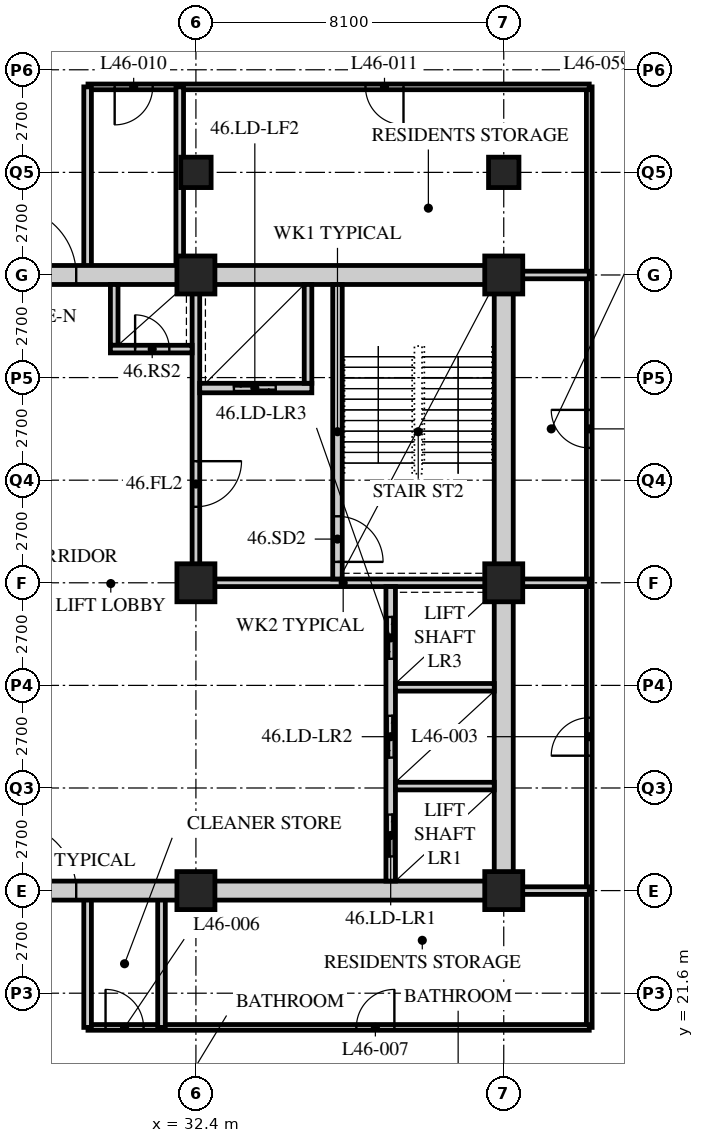
"""IFC4 building model, lengths in metres.
Left out: names, types, materials, properties, quantities, classifications, styles, units other than length and angle.
Written with IfcOpenShell. Run it as: python <this file> out.ifc"""

import sys

from ifc_helpers import new_model, si_unit, direction, frame, frame_2d, origin, origin_2d, place, context, subcontext, project, spatial, rectangle, hollow_rectangle, extrude, element, fill, save


model = new_model("IFC4")
c1 = context("Model", 3, precision=1e-05, world=origin(), true_north=direction((0.0, 1.0)))
c2 = subcontext(c1, "Body", "Model", "MODEL_VIEW")
j1 = project(units=[si_unit("LENGTHUNIT", "METRE"), si_unit("PLANEANGLEUNIT", "RADIAN")], contexts=[c1])
p1 = place(None, origin())
s1 = spatial("IfcSite", under=j1, at=p1, CompositionType="ELEMENT")
p2 = place(p1, origin())
s2 = spatial("IfcBuilding", under=s1, at=p2, CompositionType="ELEMENT")
p3 = place(p2, frame((0.0, 0.0, 181.2)))
s3 = spatial("IfcBuildingStorey", under=s2, at=p3, CompositionType="ELEMENT", Elevation=181.2)
for number, where, z_axis, x_axis in (
    (1, (32.4, 24.3, 0.0), (0.0, 0.0, 1.0), (1.0, 0.0, 0.0)),
    (2, (32.4, 32.4, 0.0), (0.0, 0.0, 1.0), (1.0, 0.0, 0.0)),
    (3, (32.4, 40.5, 0.0), (0.0, 0.0, 1.0), (1.0, 0.0, 0.0)),
):
    element("IfcColumn", number, at=place(p3, frame(where, z_axis=z_axis, x_axis=x_axis)), inside=s3, PredefinedType="COLUMN", context=c2, shape_type="SweptSolid", body=[
        extrude(hollow_rectangle(XDim=1.0, YDim=1.0, WallThickness=0.1, at=origin_2d()), origin(), (0.0, 0.0, 1.0), 3.6),
    ])
p4 = place(p3, frame((32.4, 43.2, 0.0), z_axis=(0.0, 0.0, 1.0), x_axis=(1.0, 0.0, 0.0)))
e4 = element("IfcColumn", 4, at=p4, inside=s3, PredefinedType="COLUMN", context=c2, shape_type="SweptSolid", body=[
    extrude(hollow_rectangle(XDim=0.8, YDim=0.8, WallThickness=0.08, at=origin_2d()), origin(), (0.0, 0.0, 1.0), 3.6),
])
for number, where, z_axis, x_axis in (
    (5, (40.5, 24.3, 0.0), (0.0, 0.0, 1.0), (1.0, 0.0, 0.0)),
    (6, (40.5, 32.4, 0.0), (0.0, 0.0, 1.0), (1.0, 0.0, 0.0)),
    (7, (40.5, 40.5, 0.0), (0.0, 0.0, 1.0), (1.0, 0.0, 0.0)),
):
    element("IfcColumn", number, at=place(p3, frame(where, z_axis=z_axis, x_axis=x_axis)), inside=s3, PredefinedType="COLUMN", context=c2, shape_type="SweptSolid", body=[
        extrude(hollow_rectangle(XDim=1.0, YDim=1.0, WallThickness=0.1, at=origin_2d()), origin(), (0.0, 0.0, 1.0), 3.6),
    ])
p5 = place(p3, frame((40.5, 43.2, 0.0), z_axis=(0.0, 0.0, 1.0), x_axis=(1.0, 0.0, 0.0)))
e8 = element("IfcColumn", 8, at=p5, inside=s3, PredefinedType="COLUMN", context=c2, shape_type="SweptSolid", body=[
    extrude(hollow_rectangle(XDim=0.8, YDim=0.8, WallThickness=0.08, at=origin_2d()), origin(), (0.0, 0.0, 1.0), 3.6),
])
p6 = place(p3, frame((42.75, 20.7, 0.0), z_axis=(0.0, 0.0, 1.0), x_axis=(0.0, 1.0, 0.0)))
e9 = element("IfcWall", 9, at=p6, inside=s3, PredefinedType="PARTITIONING", context=c2, shape_type="SweptSolid", body=[
    extrude(rectangle(XDim=24.75, YDim=0.15, at=frame_2d((12.375, 0.0))), origin(), (0.0, 0.0, 1.0), 3.39),
])
p7 = place(p6, frame((7.15, 0.0, 0.0)))
e10 = element("IfcOpeningElement", 10, at=p7, cuts=e9, PredefinedType="OPENING", context=c2, shape_type="SweptSolid", body=[
    extrude(rectangle(XDim=1.0, YDim=2.1, at=frame_2d((0.5, 1.05))), frame((0.0, 0.085, 0.0), z_axis=(0.0, -1.0, 0.0), x_axis=(1.0, 0.0, 0.0)), (0.0, 0.0, 1.0), 0.17),
])
p8 = place(p6, frame((15.25, 0.0, 0.0)))
e11 = element("IfcOpeningElement", 11, at=p8, cuts=e9, PredefinedType="OPENING", context=c2, shape_type="SweptSolid", body=[
    extrude(rectangle(XDim=1.0, YDim=2.1, at=frame_2d((0.5, 1.05))), frame((0.0, 0.085, 0.0), z_axis=(0.0, -1.0, 0.0), x_axis=(1.0, 0.0, 0.0)), (0.0, 0.0, 1.0), 0.17),
])
p9 = place(p3, frame((42.75, 45.45, 0.0), z_axis=(0.0, 0.0, 1.0), x_axis=(-1.0, 0.0, 0.0)))
e12 = element("IfcWall", 12, at=p9, inside=s3, PredefinedType="PARTITIONING", context=c2, shape_type="SweptSolid", body=[
    extrude(rectangle(XDim=13.19, YDim=0.15, at=frame_2d((6.595, 0.0))), origin(), (0.0, 0.0, 1.0), 3.39),
])
p10 = place(p9, frame((11.488, 0.0, 0.0)))
e13 = element("IfcOpeningElement", 13, at=p10, cuts=e12, PredefinedType="OPENING", context=c2, shape_type="SweptSolid", body=[
    extrude(rectangle(XDim=1.0, YDim=2.1, at=frame_2d((0.5, 1.05))), frame((0.0, 0.085, 0.0), z_axis=(0.0, -1.0, 0.0), x_axis=(1.0, 0.0, 0.0)), (0.0, 0.0, 1.0), 0.17),
])
p11 = place(p9, frame((4.888, 0.0, 0.0)))
e14 = element("IfcOpeningElement", 14, at=p11, cuts=e12, PredefinedType="OPENING", context=c2, shape_type="SweptSolid", body=[
    extrude(rectangle(XDim=1.0, YDim=2.1, at=frame_2d((0.5, 1.05))), frame((0.0, 0.085, 0.0), z_axis=(0.0, -1.0, 0.0), x_axis=(1.0, 0.0, 0.0)), (0.0, 0.0, 1.0), 0.17),
])
p12 = place(p3, frame((29.56, 20.7, 0.0), z_axis=(0.0, 0.0, 1.0), x_axis=(1.0, 0.0, 0.0)))
e15 = element("IfcWall", 15, at=p12, inside=s3, PredefinedType="PARTITIONING", context=c2, shape_type="SweptSolid", body=[
    extrude(rectangle(XDim=13.19, YDim=0.15, at=frame_2d((6.595, 0.0))), origin(), (0.0, 0.0, 1.0), 3.39),
])
p13 = place(p12, frame((0.462, 0.0, 0.0)))
e16 = element("IfcOpeningElement", 16, at=p13, cuts=e15, PredefinedType="OPENING", context=c2, shape_type="SweptSolid", body=[
    extrude(rectangle(XDim=1.0, YDim=2.1, at=frame_2d((0.5, 1.05))), frame((0.0, 0.085, 0.0), z_axis=(0.0, -1.0, 0.0), x_axis=(1.0, 0.0, 0.0)), (0.0, 0.0, 1.0), 0.17),
])
p14 = place(p12, frame((7.062, 0.0, 0.0)))
e17 = element("IfcOpeningElement", 17, at=p14, cuts=e15, PredefinedType="OPENING", context=c2, shape_type="SweptSolid", body=[
    extrude(rectangle(XDim=1.0, YDim=2.1, at=frame_2d((0.5, 1.05))), frame((0.0, 0.085, 0.0), z_axis=(0.0, -1.0, 0.0), x_axis=(1.0, 0.0, 0.0)), (0.0, 0.0, 1.0), 0.17),
])
p15 = place(p3, frame((40.5, 32.4, 0.0), z_axis=(0.0, 0.0, 1.0), x_axis=(1.0, 0.0, 0.0)))
e18 = element("IfcWall", 18, at=p15, inside=s3, PredefinedType="SOLIDWALL", context=c2, shape_type="SweptSolid", body=[
    extrude(rectangle(XDim=2.25, YDim=0.2, at=frame_2d((1.125, 0.0))), origin(), (0.0, 0.0, 1.0), 3.39),
])
for number, where, z_axis, x_axis in (
    (19, (31.494, 20.7, 0.0), (0.0, 0.0, 1.0), (0.0, 1.0, 0.0)),
    (20, (29.55, 20.7, 0.0), (0.0, 0.0, 1.0), (0.0, 1.0, 0.0)),
):
    element("IfcWall", number, at=place(p3, frame(where, z_axis=z_axis, x_axis=x_axis)), inside=s3, PredefinedType="SOLIDWALL", context=c2, shape_type="SweptSolid", body=[
        extrude(rectangle(XDim=3.6, YDim=0.2, at=frame_2d((1.8, 0.0))), origin(), (0.0, 0.0, 1.0), 3.39),
    ])
p16 = place(p3, frame((31.974, 45.45, 0.0), z_axis=(0.0, 0.0, 1.0), x_axis=(0.0, -1.0, 0.0)))
e21 = element("IfcWall", 21, at=p16, inside=s3, PredefinedType="SOLIDWALL", context=c2, shape_type="SweptSolid", body=[
    extrude(rectangle(XDim=4.95, YDim=0.2, at=frame_2d((2.475, 0.0))), origin(), (0.0, 0.0, 1.0), 2.69),
])
p17 = place(p3, frame((29.55, 40.5, 0.0), z_axis=(0.0, 0.0, 1.0), x_axis=(0.0, 1.0, 0.0)))
e22 = element("IfcWall", 22, at=p17, inside=s3, PredefinedType="SOLIDWALL", context=c2, shape_type="SweptSolid", body=[
    extrude(rectangle(XDim=4.95, YDim=0.2, at=frame_2d((2.475, 0.0))), origin(), (0.0, 0.0, 1.0), 3.39),
])
for number, where, z_axis, x_axis in (
    (23, (40.5, 24.3, 0.0), (0.0, 0.0, 1.0), (1.0, 0.0, 0.0)),
    (24, (40.5, 40.5, 0.0), (0.0, 0.0, 1.0), (1.0, 0.0, 0.0)),
):
    element("IfcWall", number, at=place(p3, frame(where, z_axis=z_axis, x_axis=x_axis)), inside=s3, PredefinedType="SOLIDWALL", context=c2, shape_type="SweptSolid", body=[
        extrude(rectangle(XDim=2.25, YDim=0.2, at=frame_2d((1.125, 0.0))), origin(), (0.0, 0.0, 1.0), 3.39),
    ])
p18 = place(p3, frame((15.95, 24.3, 0.0), z_axis=(0.0, 0.0, 1.0), x_axis=(1.0, 0.0, 0.0)))
e25 = element("IfcWall", 25, at=p18, inside=s3, PredefinedType="SOLIDWALL", context=c2, shape_type="SweptSolid", body=[
    extrude(rectangle(XDim=24.8, YDim=0.5, at=frame_2d((12.4, 0.0))), origin(), (0.0, 0.0, 1.0), 2.74),
])
p19 = place(p18, frame((11.5, 0.0, 0.0)))
e26 = element("IfcOpeningElement", 26, at=p19, cuts=e25, PredefinedType="OPENING", context=c2, shape_type="SweptSolid", body=[
    extrude(rectangle(XDim=1.8, YDim=2.4, at=frame_2d((0.9, 1.2))), frame((0.0, 0.26, 0.0), z_axis=(0.0, -1.0, 0.0), x_axis=(1.0, 0.0, 0.0)), (0.0, 0.0, 1.0), 0.52),
])
p20 = place(p3, frame((15.95, 40.5, 0.0), z_axis=(0.0, 0.0, 1.0), x_axis=(1.0, 0.0, 0.0)))
e27 = element("IfcWall", 27, at=p20, inside=s3, PredefinedType="SOLIDWALL", context=c2, shape_type="SweptSolid", body=[
    extrude(rectangle(XDim=24.8, YDim=0.5, at=frame_2d((12.4, 0.0))), origin(), (0.0, 0.0, 1.0), 2.74),
])
p21 = place(p20, frame((11.5, 0.0, 0.0)))
e28 = element("IfcOpeningElement", 28, at=p21, cuts=e27, PredefinedType="OPENING", context=c2, shape_type="SweptSolid", body=[
    extrude(rectangle(XDim=1.8, YDim=2.4, at=frame_2d((0.9, 1.2))), frame((0.0, 0.26, 0.0), z_axis=(0.0, -1.0, 0.0), x_axis=(1.0, 0.0, 0.0)), (0.0, 0.0, 1.0), 0.52),
])
p22 = place(p3, frame((40.5, 24.55, 0.0), z_axis=(0.0, 0.0, 1.0), x_axis=(0.0, 1.0, 0.0)))
e29 = element("IfcWall", 29, at=p22, inside=s3, PredefinedType="SOLIDWALL", context=c2, shape_type="SweptSolid", body=[
    extrude(rectangle(XDim=15.7, YDim=0.5, at=frame_2d((7.85, 0.0))), origin(), (0.0, 0.0, 1.0), 2.778),
])
p23 = place(p3, frame((32.3, 32.4, 0.0), z_axis=(0.0, 0.0, 1.0), x_axis=(1.0, 0.0, 0.0)))
e30 = element("IfcWall", 30, at=p23, inside=s3, PredefinedType="SOLIDWALL", context=c2, shape_type="SweptSolid", body=[
    extrude(rectangle(XDim=7.95, YDim=0.2, at=frame_2d((3.975, 0.0))), origin(), (0.0, 0.0, 1.0), 2.778),
])
p24 = place(p3, frame((32.4, 32.5, 0.0), z_axis=(0.0, 0.0, 1.0), x_axis=(0.0, 1.0, 0.0)))
e31 = element("IfcWall", 31, at=p24, inside=s3, PredefinedType="SOLIDWALL", context=c2, shape_type="SweptSolid", body=[
    extrude(rectangle(XDim=7.75, YDim=0.2, at=frame_2d((3.875, 0.0))), origin(), (0.0, 0.0, 1.0), 2.778),
])
p25 = place(p24, frame((1.9, 0.0, 0.0)))
e32 = element("IfcOpeningElement", 32, at=p25, cuts=e31, PredefinedType="OPENING", context=c2, shape_type="SweptSolid", body=[
    extrude(rectangle(XDim=1.2, YDim=2.1, at=frame_2d((0.6, 1.05))), frame((0.0, 0.11, 0.0), z_axis=(0.0, -1.0, 0.0), x_axis=(1.0, 0.0, 0.0)), (0.0, 0.0, 1.0), 0.22),
])
p26 = place(p3, frame((37.525, 24.55, 0.0), z_axis=(0.0, 0.0, 1.0), x_axis=(0.0, 1.0, 0.0)))
e33 = element("IfcWall", 33, at=p26, inside=s3, PredefinedType="SOLIDWALL", context=c2, shape_type="SweptSolid", body=[
    extrude(rectangle(XDim=7.75, YDim=0.25, at=frame_2d((3.875, 0.0))), origin(), (0.0, 0.0, 1.0), 3.39),
])
p27 = place(p26, frame((0.65, 0.0, 0.0)))
e34 = element("IfcOpeningElement", 34, at=p27, cuts=e33, PredefinedType="OPENING", context=c2, shape_type="SweptSolid", body=[
    extrude(rectangle(XDim=1.1, YDim=2.4, at=frame_2d((0.55, 1.2))), frame((0.0, 0.135, 0.0), z_axis=(0.0, -1.0, 0.0), x_axis=(1.0, 0.0, 0.0)), (0.0, 0.0, 1.0), 0.27),
])
p28 = place(p26, frame((3.25, 0.0, 0.0)))
e35 = element("IfcOpeningElement", 35, at=p28, cuts=e33, PredefinedType="OPENING", context=c2, shape_type="SweptSolid", body=[
    extrude(rectangle(XDim=1.1, YDim=2.4, at=frame_2d((0.55, 1.2))), frame((0.0, 0.135, 0.0), z_axis=(0.0, -1.0, 0.0), x_axis=(1.0, 0.0, 0.0)), (0.0, 0.0, 1.0), 0.27),
])
p29 = place(p26, frame((5.85, 0.0, 0.0)))
e36 = element("IfcOpeningElement", 36, at=p29, cuts=e33, PredefinedType="OPENING", context=c2, shape_type="SweptSolid", body=[
    extrude(rectangle(XDim=1.1, YDim=2.4, at=frame_2d((0.55, 1.2))), frame((0.0, 0.135, 0.0), z_axis=(0.0, -1.0, 0.0), x_axis=(1.0, 0.0, 0.0)), (0.0, 0.0, 1.0), 0.27),
])
for number, where, z_axis, x_axis in (
    (37, (37.65, 27.05, 0.0), (0.0, 0.0, 1.0), (1.0, 0.0, 0.0)),
    (38, (37.65, 29.65, 0.0), (0.0, 0.0, 1.0), (1.0, 0.0, 0.0)),
):
    element("IfcWall", number, at=place(p3, frame(where, z_axis=z_axis, x_axis=x_axis)), inside=s3, PredefinedType="SOLIDWALL", context=c2, shape_type="SweptSolid", body=[
        extrude(rectangle(XDim=2.6, YDim=0.2, at=frame_2d((1.3, 0.0))), origin(), (0.0, 0.0, 1.0), 3.39),
    ])
p30 = place(p3, frame((36.125, 32.5, 0.0), z_axis=(0.0, 0.0, 1.0), x_axis=(0.0, 1.0, 0.0)))
e39 = element("IfcWall", 39, at=p30, inside=s3, PredefinedType="SOLIDWALL", context=c2, shape_type="SweptSolid", body=[
    extrude(rectangle(XDim=7.75, YDim=0.25, at=frame_2d((3.875, 0.0))), origin(), (0.0, 0.0, 1.0), 3.39),
])
p31 = place(p30, frame((0.45, 0.0, 0.0)))
e40 = element("IfcOpeningElement", 40, at=p31, cuts=e39, PredefinedType="OPENING", context=c2, shape_type="SweptSolid", body=[
    extrude(rectangle(XDim=1.2, YDim=2.1, at=frame_2d((0.6, 1.05))), frame((0.0, 0.135, 0.0), z_axis=(0.0, -1.0, 0.0), x_axis=(1.0, 0.0, 0.0)), (0.0, 0.0, 1.0), 0.27),
])
p32 = place(p3, frame((32.5, 37.525, 0.0), z_axis=(0.0, 0.0, 1.0), x_axis=(1.0, 0.0, 0.0)))
e41 = element("IfcWall", 41, at=p32, inside=s3, PredefinedType="SOLIDWALL", context=c2, shape_type="SweptSolid", body=[
    extrude(rectangle(XDim=2.95, YDim=0.25, at=frame_2d((1.475, 0.0))), origin(), (0.0, 0.0, 1.0), 3.39),
])
p33 = place(p32, frame((0.9, 0.0, 0.0)))
e42 = element("IfcOpeningElement", 42, at=p33, cuts=e41, PredefinedType="OPENING", context=c2, shape_type="SweptSolid", body=[
    extrude(rectangle(XDim=1.1, YDim=2.4, at=frame_2d((0.55, 1.2))), frame((0.0, 0.135, 0.0), z_axis=(0.0, -1.0, 0.0), x_axis=(1.0, 0.0, 0.0)), (0.0, 0.0, 1.0), 0.27),
])
p34 = place(p3, frame((35.35, 37.65, 0.0), z_axis=(0.0, 0.0, 1.0), x_axis=(0.0, 1.0, 0.0)))
e43 = element("IfcWall", 43, at=p34, inside=s3, PredefinedType="SOLIDWALL", context=c2, shape_type="SweptSolid", body=[
    extrude(rectangle(XDim=2.6, YDim=0.2, at=frame_2d((1.3, 0.0))), origin(), (0.0, 0.0, 1.0), 3.39),
])
p35 = place(p3, frame((30.25, 38.65, 0.0), z_axis=(0.0, 0.0, 1.0), x_axis=(0.0, 1.0, 0.0)))
e44 = element("IfcWall", 44, at=p35, inside=s3, PredefinedType="SOLIDWALL", context=c2, shape_type="SweptSolid", body=[
    extrude(rectangle(XDim=1.6, YDim=0.2, at=frame_2d((0.8, 0.0))), origin(), (0.0, 0.0, 1.0), 3.39),
])
p36 = place(p3, frame((30.15, 38.55, 0.0), z_axis=(0.0, 0.0, 1.0), x_axis=(1.0, 0.0, 0.0)))
e45 = element("IfcWall", 45, at=p36, inside=s3, PredefinedType="SOLIDWALL", context=c2, shape_type="SweptSolid", body=[
    extrude(rectangle(XDim=2.15, YDim=0.2, at=frame_2d((1.075, 0.0))), origin(), (0.0, 0.0, 1.0), 3.39),
])
p37 = place(p36, frame((0.65, 0.0, 0.0)))
e46 = element("IfcOpeningElement", 46, at=p37, cuts=e45, PredefinedType="OPENING", context=c2, shape_type="SweptSolid", body=[
    extrude(rectangle(XDim=0.9, YDim=2.1, at=frame_2d((0.45, 1.05))), frame((0.0, 0.11, 0.0), z_axis=(0.0, -1.0, 0.0), x_axis=(1.0, 0.0, 0.0)), (0.0, 0.0, 1.0), 0.22),
])
p38 = place(p7, origin())
e47 = element("IfcDoor", 47, at=p38, inside=s3, OperationType="SINGLE_SWING_LEFT", PredefinedType="DOOR", context=c2, shape_type="SweptSolid", body=[
    extrude(rectangle(XDim=1.0, YDim=2.1, at=frame_2d((0.5, 1.05))), frame((0.0, 0.025, 0.0), z_axis=(0.0, -1.0, 0.0), x_axis=(1.0, 0.0, 0.0)), (0.0, 0.0, 1.0), 0.05),
])
fill(e10, e47)
p39 = place(p8, origin())
e48 = element("IfcDoor", 48, at=p39, inside=s3, OperationType="SINGLE_SWING_RIGHT", PredefinedType="DOOR", context=c2, shape_type="SweptSolid", body=[
    extrude(rectangle(XDim=1.0, YDim=2.1, at=frame_2d((0.5, 1.05))), frame((0.0, 0.025, 0.0), z_axis=(0.0, -1.0, 0.0), x_axis=(1.0, 0.0, 0.0)), (0.0, 0.0, 1.0), 0.05),
])
fill(e11, e48)
p40 = place(p13, origin())
e49 = element("IfcDoor", 49, at=p40, inside=s3, OperationType="SINGLE_SWING_LEFT", PredefinedType="DOOR", context=c2, shape_type="SweptSolid", body=[
    extrude(rectangle(XDim=1.0, YDim=2.1, at=frame_2d((0.5, 1.05))), frame((0.0, 0.025, 0.0), z_axis=(0.0, -1.0, 0.0), x_axis=(1.0, 0.0, 0.0)), (0.0, 0.0, 1.0), 0.05),
])
fill(e16, e49)
p41 = place(p14, origin())
e50 = element("IfcDoor", 50, at=p41, inside=s3, OperationType="SINGLE_SWING_RIGHT", PredefinedType="DOOR", context=c2, shape_type="SweptSolid", body=[
    extrude(rectangle(XDim=1.0, YDim=2.1, at=frame_2d((0.5, 1.05))), frame((0.0, 0.025, 0.0), z_axis=(0.0, -1.0, 0.0), x_axis=(1.0, 0.0, 0.0)), (0.0, 0.0, 1.0), 0.05),
])
fill(e17, e50)
p42 = place(p10, origin())
e51 = element("IfcDoor", 51, at=p42, inside=s3, OperationType="SINGLE_SWING_RIGHT", PredefinedType="DOOR", context=c2, shape_type="SweptSolid", body=[
    extrude(rectangle(XDim=1.0, YDim=2.1, at=frame_2d((0.5, 1.05))), frame((0.0, 0.025, 0.0), z_axis=(0.0, -1.0, 0.0), x_axis=(1.0, 0.0, 0.0)), (0.0, 0.0, 1.0), 0.05),
])
fill(e13, e51)
p43 = place(p11, origin())
e52 = element("IfcDoor", 52, at=p43, inside=s3, OperationType="SINGLE_SWING_LEFT", PredefinedType="DOOR", context=c2, shape_type="SweptSolid", body=[
    extrude(rectangle(XDim=1.0, YDim=2.1, at=frame_2d((0.5, 1.05))), frame((0.0, 0.025, 0.0), z_axis=(0.0, -1.0, 0.0), x_axis=(1.0, 0.0, 0.0)), (0.0, 0.0, 1.0), 0.05),
])
fill(e14, e52)
p44 = place(p31, origin())
e53 = element("IfcDoor", 53, at=p44, inside=s3, OperationType="SINGLE_SWING_RIGHT", PredefinedType="DOOR", context=c2, shape_type="SweptSolid", body=[
    extrude(rectangle(XDim=1.2, YDim=2.1, at=frame_2d((0.6, 1.05))), frame((0.0, 0.025, 0.0), z_axis=(0.0, -1.0, 0.0), x_axis=(1.0, 0.0, 0.0)), (0.0, 0.0, 1.0), 0.05),
])
fill(e40, e53)
p45 = place(p25, origin())
e54 = element("IfcDoor", 54, at=p45, inside=s3, OperationType="SINGLE_SWING_LEFT", PredefinedType="DOOR", context=c2, shape_type="SweptSolid", body=[
    extrude(rectangle(XDim=1.2, YDim=2.1, at=frame_2d((0.6, 1.05))), frame((0.0, 0.025, 0.0), z_axis=(0.0, -1.0, 0.0), x_axis=(1.0, 0.0, 0.0)), (0.0, 0.0, 1.0), 0.05),
])
fill(e32, e54)
p46 = place(p37, origin())
e55 = element("IfcDoor", 55, at=p46, inside=s3, OperationType="SINGLE_SWING_LEFT", PredefinedType="DOOR", context=c2, shape_type="SweptSolid", body=[
    extrude(rectangle(XDim=0.9, YDim=2.1, at=frame_2d((0.45, 1.05))), frame((0.0, 0.025, 0.0), z_axis=(0.0, -1.0, 0.0), x_axis=(1.0, 0.0, 0.0)), (0.0, 0.0, 1.0), 0.05),
])
fill(e46, e55)
p47 = place(p27, origin())
e56 = element("IfcDoor", 56, at=p47, inside=s3, OperationType="DOUBLE_DOOR_SLIDING", PredefinedType="DOOR", context=c2, shape_type="SweptSolid", body=[
    extrude(rectangle(XDim=1.1, YDim=2.4, at=frame_2d((0.55, 1.2))), frame((0.0, 0.025, 0.0), z_axis=(0.0, -1.0, 0.0), x_axis=(1.0, 0.0, 0.0)), (0.0, 0.0, 1.0), 0.05),
])
fill(e34, e56)
p48 = place(p28, origin())
e57 = element("IfcDoor", 57, at=p48, inside=s3, OperationType="DOUBLE_DOOR_SLIDING", PredefinedType="DOOR", context=c2, shape_type="SweptSolid", body=[
    extrude(rectangle(XDim=1.1, YDim=2.4, at=frame_2d((0.55, 1.2))), frame((0.0, 0.025, 0.0), z_axis=(0.0, -1.0, 0.0), x_axis=(1.0, 0.0, 0.0)), (0.0, 0.0, 1.0), 0.05),
])
fill(e35, e57)
p49 = place(p29, origin())
e58 = element("IfcDoor", 58, at=p49, inside=s3, OperationType="DOUBLE_DOOR_SLIDING", PredefinedType="DOOR", context=c2, shape_type="SweptSolid", body=[
    extrude(rectangle(XDim=1.1, YDim=2.4, at=frame_2d((0.55, 1.2))), frame((0.0, 0.025, 0.0), z_axis=(0.0, -1.0, 0.0), x_axis=(1.0, 0.0, 0.0)), (0.0, 0.0, 1.0), 0.05),
])
fill(e36, e58)
p50 = place(p33, origin())
e59 = element("IfcDoor", 59, at=p50, inside=s3, OperationType="DOUBLE_DOOR_SLIDING", PredefinedType="DOOR", context=c2, shape_type="SweptSolid", body=[
    extrude(rectangle(XDim=1.1, YDim=2.4, at=frame_2d((0.55, 1.2))), frame((0.0, 0.025, 0.0), z_axis=(0.0, -1.0, 0.0), x_axis=(1.0, 0.0, 0.0)), (0.0, 0.0, 1.0), 0.05),
])
fill(e42, e59)
p51 = place(p19, origin())
e60 = element("IfcDoor", 60, at=p51, inside=s3, OperationType="DOUBLE_DOOR_SINGLE_SWING", PredefinedType="DOOR", context=c2, shape_type="SweptSolid", body=[
    extrude(rectangle(XDim=1.8, YDim=2.4, at=frame_2d((0.9, 1.2))), frame((0.0, 0.025, 0.0), z_axis=(0.0, -1.0, 0.0), x_axis=(1.0, 0.0, 0.0)), (0.0, 0.0, 1.0), 0.05),
])
fill(e26, e60)
p52 = place(p21, origin())
e61 = element("IfcDoor", 61, at=p52, inside=s3, OperationType="DOUBLE_DOOR_SINGLE_SWING", PredefinedType="DOOR", context=c2, shape_type="SweptSolid", body=[
    extrude(rectangle(XDim=1.8, YDim=2.4, at=frame_2d((0.9, 1.2))), frame((0.0, 0.025, 0.0), z_axis=(0.0, -1.0, 0.0), x_axis=(1.0, 0.0, 0.0)), (0.0, 0.0, 1.0), 0.05),
])
fill(e28, e61)
save(model, sys.argv[1])
